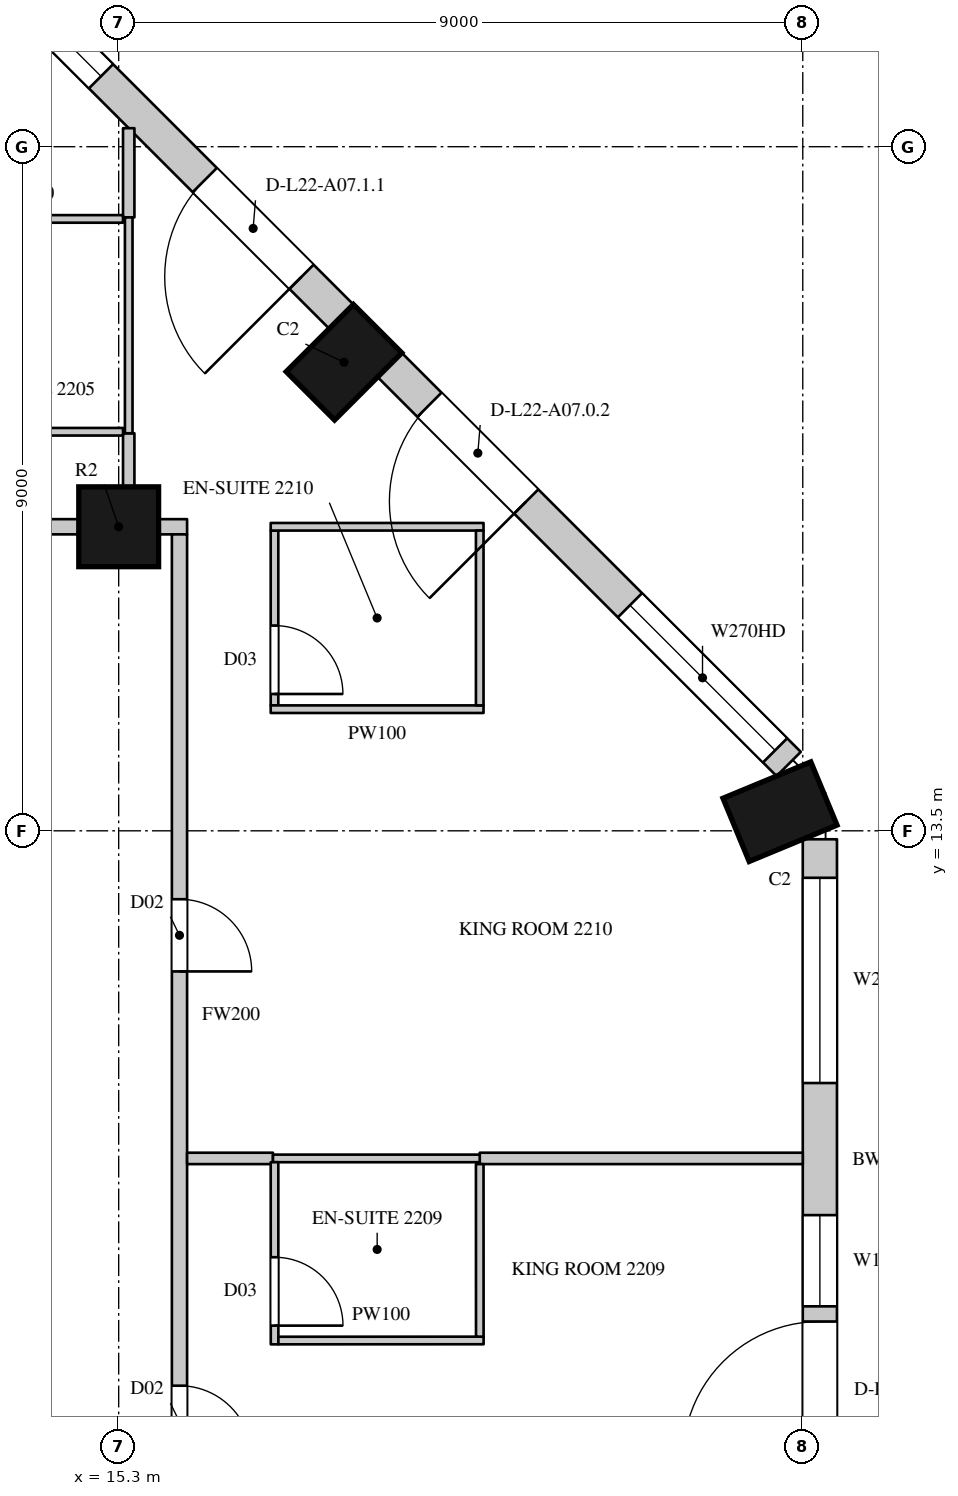
"""IFC4 building model, lengths in metres.
Left out: names, types, materials, properties, quantities, classifications, styles, units other than length and angle.
Written with IfcOpenShell. Run it as: python <this file> out.ifc"""

import sys

from ifc_helpers import new_model, si_unit, direction, frame, frame_2d, origin, origin_2d, place, context, subcontext, project, spatial, rectangle, circle, extrude, element, fill, save


model = new_model("IFC4")
c1 = context("Model", 3, precision=1e-05, world=origin(), true_north=direction((0.0, 1.0)))
c2 = subcontext(c1, "Body", "Model", "MODEL_VIEW")
j1 = project(units=[si_unit("LENGTHUNIT", "METRE"), si_unit("PLANEANGLEUNIT", "RADIAN")], contexts=[c1])
p1 = place(None, origin())
s1 = spatial("IfcSite", under=j1, at=p1, CompositionType="ELEMENT")
p2 = place(p1, origin())
s2 = spatial("IfcBuilding", under=s1, at=p2, CompositionType="ELEMENT")
p3 = place(p2, frame((0.0, 0.0, 109.5)))
s3 = spatial("IfcBuildingStorey", under=s2, at=p3, CompositionType="ELEMENT", Elevation=109.5)
for number, where, z_axis, x_axis in (
    (1, (24.0, 13.752, 0.0), (0.0, 0.0, 1.0), (-0.383, 0.924, 0.0)),
    (2, (18.264, 19.664, 0.0), (0.0, 0.0, 1.0), (-0.707, 0.707, 0.0)),
):
    element("IfcColumn", number, at=place(p3, frame(where, z_axis=z_axis, x_axis=x_axis)), inside=s3, PredefinedType="COLUMN", context=c2, shape_type="SweptSolid", body=[
        extrude(rectangle(XDim=0.9, YDim=1.25, at=origin_2d()), origin(), (0.0, 0.0, 1.0), 3.6),
    ])
p4 = place(p3, frame((15.3, 17.5, 0.0), z_axis=(0.0, 0.0, 1.0), x_axis=(1.0, 0.0, 0.0)))
e3 = element("IfcColumn", 3, at=p4, inside=s3, PredefinedType="COLUMN", context=c2, shape_type="SweptSolid", body=[
    extrude(circle(Radius=0.525, at=origin_2d()), origin(), (0.0, 0.0, 1.0), 3.6),
])
p5 = place(p3, frame((24.525, 4.95, 0.0), z_axis=(0.0, 0.0, 1.0), x_axis=(0.0, 1.0, 0.0)))
e4 = element("IfcWall", 4, at=p5, inside=s3, PredefinedType="SOLIDWALL", context=c2, shape_type="SweptSolid", body=[
    extrude(rectangle(XDim=8.439, YDim=0.45, at=frame_2d((4.219, 0.0))), origin(), (0.0, 0.0, 1.0), 3.3),
])
p6 = place(p5, frame((0.294, 0.0, 0.0)))
e5 = element("IfcOpeningElement", 5, at=p6, cuts=e4, PredefinedType="OPENING", context=c2, shape_type="SweptSolid", body=[
    extrude(rectangle(XDim=1.8, YDim=2.4, at=frame_2d((0.9, 1.2))), frame((0.0, 0.235, 0.0), z_axis=(0.0, -1.0, 0.0), x_axis=(1.0, 0.0, 0.0)), (0.0, 0.0, 1.0), 0.47),
])
p7 = place(p5, frame((2.294, 0.0, 1.05)))
e6 = element("IfcOpeningElement", 6, at=p7, cuts=e4, PredefinedType="OPENING", context=c2, shape_type="SweptSolid", body=[
    extrude(rectangle(XDim=1.2, YDim=2.0, at=frame_2d((0.6, 1.0))), frame((0.0, 0.235, 0.0), z_axis=(0.0, -1.0, 0.0), x_axis=(1.0, 0.0, 0.0)), (0.0, 0.0, 1.0), 0.47),
])
p8 = place(p5, frame((5.232, 0.0, 1.05)))
e7 = element("IfcOpeningElement", 7, at=p8, cuts=e4, PredefinedType="OPENING", context=c2, shape_type="SweptSolid", body=[
    extrude(rectangle(XDim=2.7, YDim=2.0, at=frame_2d((1.35, 1.0))), frame((0.0, 0.235, 0.0), z_axis=(0.0, -1.0, 0.0), x_axis=(1.0, 0.0, 0.0)), (0.0, 0.0, 1.0), 0.47),
])
p9 = place(p3, frame((24.115, 14.379, 0.0), z_axis=(0.0, 0.0, 1.0), x_axis=(-0.707106781187, 0.707106781187, 0.0)))
e8 = element("IfcWall", 8, at=p9, inside=s3, PredefinedType="SOLIDWALL", context=c2, shape_type="SweptSolid", body=[
    extrude(rectangle(XDim=7.424, YDim=0.45, at=frame_2d((3.712, 0.0))), origin(), (0.0, 0.0, 1.0), 3.3),
])
p10 = place(p9, frame((0.253, 0.0, 1.05)))
e9 = element("IfcOpeningElement", 9, at=p10, cuts=e8, PredefinedType="OPENING", context=c2, shape_type="SweptSolid", body=[
    extrude(rectangle(XDim=2.7, YDim=2.0, at=frame_2d((1.35, 1.0))), frame((0.0, 0.235, 0.0), z_axis=(0.0, -1.0, 0.0), x_axis=(1.0, 0.0, 0.0)), (0.0, 0.0, 1.0), 0.47),
])
p11 = place(p9, frame((4.884, 0.0, 0.0)))
e10 = element("IfcOpeningElement", 10, at=p11, cuts=e8, PredefinedType="OPENING", context=c2, shape_type="SweptSolid", body=[
    extrude(rectangle(XDim=1.8, YDim=2.4, at=frame_2d((0.9, 1.2))), frame((0.0, 0.235, 0.0), z_axis=(0.0, -1.0, 0.0), x_axis=(1.0, 0.0, 0.0)), (0.0, 0.0, 1.0), 0.47),
])
p12 = place(p3, frame((18.229, 20.265, 0.0), z_axis=(0.0, 0.0, 1.0), x_axis=(-0.707106781187, 0.707106781187, 0.0)))
e11 = element("IfcWall", 11, at=p12, inside=s3, PredefinedType="SOLIDWALL", context=c2, shape_type="SweptSolid", body=[
    extrude(rectangle(XDim=7.424, YDim=0.45, at=frame_2d((3.712, 0.0))), origin(), (0.0, 0.0, 1.0), 3.3),
])
p13 = place(p12, frame((0.74, 0.0, 0.0)))
e12 = element("IfcOpeningElement", 12, at=p13, cuts=e11, PredefinedType="OPENING", context=c2, shape_type="SweptSolid", body=[
    extrude(rectangle(XDim=1.8, YDim=2.4, at=frame_2d((0.9, 1.2))), frame((0.0, 0.235, 0.0), z_axis=(0.0, -1.0, 0.0), x_axis=(1.0, 0.0, 0.0)), (0.0, 0.0, 1.0), 0.47),
])
p14 = place(p12, frame((4.471, 0.0, 1.05)))
e13 = element("IfcOpeningElement", 13, at=p14, cuts=e11, PredefinedType="OPENING", context=c2, shape_type="SweptSolid", body=[
    extrude(rectangle(XDim=2.7, YDim=2.0, at=frame_2d((1.35, 1.0))), frame((0.0, 0.235, 0.0), z_axis=(0.0, -1.0, 0.0), x_axis=(1.0, 0.0, 0.0)), (0.0, 0.0, 1.0), 0.47),
])
p15 = place(p3, frame((23.15, 16.864, 0.0), z_axis=(0.0, 0.0, 1.0), x_axis=(-0.707106781187, 0.707106781187, 0.0)))
e14 = element("IfcWall", 14, at=p15, inside=s3, PredefinedType="SOLIDWALL", context=c2, shape_type="SweptSolid", body=[
    extrude(rectangle(XDim=1.445, YDim=0.45, at=frame_2d((0.722, 0.0))), origin(), (0.0, 0.0, 1.0), 0.6),
])
p16 = place(p3, frame((19.937, 20.078, 0.0), z_axis=(0.0, 0.0, 1.0), x_axis=(-0.707106781187, 0.707106781187, 0.0)))
e15 = element("IfcWall", 15, at=p16, inside=s3, PredefinedType="SOLIDWALL", context=c2, shape_type="SweptSolid", body=[
    extrude(rectangle(XDim=1.781, YDim=0.45, at=frame_2d((0.89, 0.0))), origin(), (0.0, 0.0, 1.0), 0.6),
])
p17 = place(p3, frame((16.486, 23.529, 0.0), z_axis=(0.0, 0.0, 1.0), x_axis=(-0.707022305137, 0.707191247145, 0.0)))
e16 = element("IfcWall", 16, at=p17, inside=s3, PredefinedType="SOLIDWALL", context=c2, shape_type="SweptSolid", body=[
    extrude(rectangle(XDim=1.445, YDim=0.45, at=frame_2d((0.723, 0.0))), origin(), (0.0, 0.0, 1.0), 0.6),
])
p18 = place(p3, frame((6.825, 17.5, 0.0), z_axis=(0.0, 0.0, 1.0), x_axis=(1.0, 0.0, 0.0)))
e17 = element("IfcWall", 17, at=p18, inside=s3, PredefinedType="PARTITIONING", context=c2, shape_type="SweptSolid", body=[
    extrude(rectangle(XDim=7.95, YDim=0.2, at=frame_2d((3.975, 0.0))), origin(), (0.0, 0.0, 1.0), 2.75),
])
p19 = place(p18, frame((1.55, 0.0, 0.0)))
e18 = element("IfcOpeningElement", 18, at=p19, cuts=e17, PredefinedType="OPENING", context=c2, shape_type="SweptSolid", body=[
    extrude(rectangle(XDim=1.1, YDim=2.4, at=frame_2d((0.55, 1.2))), frame((0.0, 0.11, 0.0), z_axis=(0.0, -1.0, 0.0), x_axis=(1.0, 0.0, 0.0)), (0.0, 0.0, 1.0), 0.22),
])
p20 = place(p3, frame((15.825, 17.5, 0.0), z_axis=(0.0, 0.0, 1.0), x_axis=(1.0, 0.0, 0.0)))
e19 = element("IfcWall", 19, at=p20, inside=s3, PredefinedType="PARTITIONING", context=c2, shape_type="SweptSolid", body=[
    extrude(rectangle(XDim=0.375, YDim=0.2, at=frame_2d((0.188, 0.0))), origin(), (0.0, 0.0, 1.0), 3.3),
])
p21 = place(p3, frame((16.1, 4.75, 0.0), z_axis=(0.0, 0.0, 1.0), x_axis=(0.0, 1.0, 0.0)))
e20 = element("IfcWall", 20, at=p21, inside=s3, PredefinedType="PARTITIONING", context=c2, shape_type="SweptSolid", body=[
    extrude(rectangle(XDim=12.65, YDim=0.2, at=frame_2d((6.325, 0.0))), origin(), (0.0, 0.0, 1.0), 3.3),
])
p22 = place(p21, frame((0.5, 0.0, 0.0)))
e21 = element("IfcOpeningElement", 21, at=p22, cuts=e20, PredefinedType="OPENING", context=c2, shape_type="SweptSolid", body=[
    extrude(rectangle(XDim=0.95, YDim=2.2, at=frame_2d((0.475, 1.1))), frame((0.0, 0.11, 0.0), z_axis=(0.0, -1.0, 0.0), x_axis=(1.0, 0.0, 0.0)), (0.0, 0.0, 1.0), 0.22),
])
p23 = place(p21, frame((6.9, 0.0, 0.0)))
e22 = element("IfcOpeningElement", 22, at=p23, cuts=e20, PredefinedType="OPENING", context=c2, shape_type="SweptSolid", body=[
    extrude(rectangle(XDim=0.95, YDim=2.2, at=frame_2d((0.475, 1.1))), frame((0.0, 0.11, 0.0), z_axis=(0.0, -1.0, 0.0), x_axis=(1.0, 0.0, 0.0)), (0.0, 0.0, 1.0), 0.22),
])
p24 = place(p3, frame((15.432, 18.016, 0.0), z_axis=(0.0, 0.0, 1.0), x_axis=(0.0, 1.0, 0.0)))
e23 = element("IfcWall", 23, at=p24, inside=s3, PredefinedType="PARTITIONING", context=c2, shape_type="SweptSolid", body=[
    extrude(rectangle(XDim=0.714, YDim=0.15, at=frame_2d((0.357, 0.0))), origin(), (0.0, 0.0, 1.0), 3.3),
])
p25 = place(p3, frame((15.432, 21.57, 0.0), z_axis=(0.0, 0.0, 1.0), x_axis=(0.0, 1.0, 0.0)))
e24 = element("IfcWall", 24, at=p25, inside=s3, PredefinedType="PARTITIONING", context=c2, shape_type="SweptSolid", body=[
    extrude(rectangle(XDim=1.174, YDim=0.15, at=frame_2d((0.587, 0.0))), origin(), (0.0, 0.0, 1.0), 3.3),
])
p26 = place(p3, frame((16.2, 9.19, 0.0), z_axis=(0.0, 0.0, 1.0), x_axis=(1.0, 0.0, 0.0)))
e25 = element("IfcWall", 25, at=p26, inside=s3, PredefinedType="PARTITIONING", context=c2, shape_type="SweptSolid", body=[
    extrude(rectangle(XDim=1.13, YDim=0.15, at=frame_2d((0.565, 0.0))), origin(), (0.0, 0.0, 1.0), 2.65),
])
p27 = place(p3, frame((20.05, 9.19, 0.0), z_axis=(0.0, 0.0, 1.0), x_axis=(1.0, 0.0, 0.0)))
e26 = element("IfcWall", 26, at=p27, inside=s3, PredefinedType="PARTITIONING", context=c2, shape_type="SweptSolid", body=[
    extrude(rectangle(XDim=4.25, YDim=0.15, at=frame_2d((2.125, 0.0))), origin(), (0.0, 0.0, 1.0), 2.65),
])
for number, where, z_axis, x_axis in (
    (27, (12.786, 18.75, 0.0), (0.0, 0.0, 1.0), (1.0, 0.0, 0.0)),
    (28, (12.786, 21.55, 0.0), (0.0, 0.0, 1.0), (1.0, 0.0, 0.0)),
):
    element("IfcWall", number, at=place(p3, frame(where, z_axis=z_axis, x_axis=x_axis)), inside=s3, PredefinedType="PARTITIONING", context=c2, shape_type="SweptSolid", body=[
        extrude(rectangle(XDim=2.571, YDim=0.1, at=frame_2d((1.286, 0.0))), origin(), (0.0, 0.0, 1.0), 3.3),
    ])
p28 = place(p3, frame((15.432, 18.73, 0.0), z_axis=(0.0, 0.0, 1.0), x_axis=(0.0, 1.0, 0.0)))
e29 = element("IfcWall", 29, at=p28, inside=s3, PredefinedType="PARTITIONING", context=c2, shape_type="SweptSolid", body=[
    extrude(rectangle(XDim=2.84, YDim=0.1, at=frame_2d((1.42, 0.0))), origin(), (0.0, 0.0, 1.0), 3.3),
])
p29 = place(p3, frame((17.33, 9.19, 0.0), z_axis=(0.0, 0.0, 1.0), x_axis=(1.0, 0.0, 0.0)))
e30 = element("IfcWall", 30, at=p29, inside=s3, PredefinedType="PARTITIONING", context=c2, shape_type="SweptSolid", body=[
    extrude(rectangle(XDim=2.72, YDim=0.1, at=frame_2d((1.36, 0.0))), origin(), (0.0, 0.0, 1.0), 2.65),
])
p30 = place(p3, frame((17.35, 9.14, 0.0), z_axis=(0.0, 0.0, 1.0), x_axis=(0.000407580973, -0.999999916939, 0.0)))
e31 = element("IfcWall", 31, at=p30, inside=s3, PredefinedType="PARTITIONING", context=c2, shape_type="SweptSolid", body=[
    extrude(rectangle(XDim=2.396, YDim=0.1, at=frame_2d((1.198, 0.0))), origin(), (0.0, 0.0, 1.0), 3.3),
])
p31 = place(p30, frame((1.25, 0.0, 0.0)))
e32 = element("IfcOpeningElement", 32, at=p31, cuts=e31, PredefinedType="OPENING", context=c2, shape_type="SweptSolid", body=[
    extrude(rectangle(XDim=0.9, YDim=2.2, at=frame_2d((0.45, 1.1))), frame((0.0, 0.06, 0.0), z_axis=(0.0, -1.0, 0.0), x_axis=(1.0, 0.0, 0.0)), (0.0, 0.0, 1.0), 0.12),
])
p32 = place(p3, frame((17.35, 15.15, 0.0), z_axis=(0.0, 0.0, 1.0), x_axis=(0.0, 1.0, 0.0)))
e33 = element("IfcWall", 33, at=p32, inside=s3, PredefinedType="PARTITIONING", context=c2, shape_type="SweptSolid", body=[
    extrude(rectangle(XDim=2.3, YDim=0.1, at=frame_2d((1.15, 0.0))), origin(), (0.0, 0.0, 1.0), 3.3),
])
p33 = place(p32, frame((0.15, 0.0, 0.0)))
e34 = element("IfcOpeningElement", 34, at=p33, cuts=e33, PredefinedType="OPENING", context=c2, shape_type="SweptSolid", body=[
    extrude(rectangle(XDim=0.9, YDim=2.2, at=frame_2d((0.45, 1.1))), frame((0.0, 0.06, 0.0), z_axis=(0.0, -1.0, 0.0), x_axis=(1.0, 0.0, 0.0)), (0.0, 0.0, 1.0), 0.12),
])
for number, where, z_axis, x_axis in (
    (35, (17.3, 15.1, 0.0), (0.0, 0.0, 1.0), (1.0, 0.0, 0.0)),
    (36, (17.3, 17.5, 0.0), (0.0, 0.0, 1.0), (1.0, 0.0, 0.0)),
):
    element("IfcWall", number, at=place(p3, frame(where, z_axis=z_axis, x_axis=x_axis)), inside=s3, PredefinedType="PARTITIONING", context=c2, shape_type="SweptSolid", body=[
        extrude(rectangle(XDim=2.8, YDim=0.1, at=frame_2d((1.4, 0.0))), origin(), (0.0, 0.0, 1.0), 3.3),
    ])
p34 = place(p3, frame((17.401, 6.794, 0.0), z_axis=(0.0, 0.0, 1.0), x_axis=(0.9999999346, 0.000361663629, 0.0)))
e37 = element("IfcWall", 37, at=p34, inside=s3, PredefinedType="PARTITIONING", context=c2, shape_type="SweptSolid", body=[
    extrude(rectangle(XDim=2.7, YDim=0.1, at=frame_2d((1.35, 0.0))), origin(), (0.0, 0.0, 1.0), 3.3),
])
p35 = place(p3, frame((20.05, 9.115, 0.0), z_axis=(0.0, 0.0, 1.0), x_axis=(0.000430200003, -0.999999907464, 0.0)))
e38 = element("IfcWall", 38, at=p35, inside=s3, PredefinedType="PARTITIONING", context=c2, shape_type="SweptSolid", body=[
    extrude(rectangle(XDim=2.27, YDim=0.1, at=frame_2d((1.135, 0.0))), origin(), (0.0, 0.0, 1.0), 3.3),
])
p36 = place(p3, frame((20.05, 15.15, 0.0), z_axis=(0.0, 0.0, 1.0), x_axis=(0.0, 1.0, 0.0)))
e39 = element("IfcWall", 39, at=p36, inside=s3, PredefinedType="PARTITIONING", context=c2, shape_type="SweptSolid", body=[
    extrude(rectangle(XDim=2.3, YDim=0.1, at=frame_2d((1.15, 0.0))), origin(), (0.0, 0.0, 1.0), 3.3),
])
p37 = place(p6, origin())
e40 = element("IfcDoor", 40, at=p37, inside=s3, OperationType="SLIDING_TO_LEFT", PredefinedType="DOOR", context=c2, shape_type="SweptSolid", body=[
    extrude(rectangle(XDim=1.8, YDim=2.4, at=frame_2d((0.9, 1.2))), frame((0.0, 0.13, 0.0), z_axis=(0.0, -1.0, 0.0), x_axis=(1.0, 0.0, 0.0)), (0.0, 0.0, 1.0), 0.05),
])
fill(e5, e40)
p38 = place(p7, origin())
e41 = element("IfcWindow", 41, at=p38, inside=s3, PartitioningType="SINGLE_PANEL", PredefinedType="WINDOW", context=c2, shape_type="SweptSolid", body=[
    extrude(rectangle(XDim=1.2, YDim=2.0, at=frame_2d((0.6, 1.0))), frame((0.0, 0.135, 0.0), z_axis=(0.0, -1.0, 0.0), x_axis=(1.0, 0.0, 0.0)), (0.0, 0.0, 1.0), 0.06),
])
fill(e6, e41)
p39 = place(p8, origin())
e42 = element("IfcWindow", 42, at=p39, inside=s3, PartitioningType="SINGLE_PANEL", PredefinedType="WINDOW", context=c2, shape_type="SweptSolid", body=[
    extrude(rectangle(XDim=2.7, YDim=2.0, at=frame_2d((1.35, 1.0))), frame((0.0, 0.135, 0.0), z_axis=(0.0, -1.0, 0.0), x_axis=(1.0, 0.0, 0.0)), (0.0, 0.0, 1.0), 0.06),
])
fill(e7, e42)
p40 = place(p10, origin())
e43 = element("IfcWindow", 43, at=p40, inside=s3, PartitioningType="SINGLE_PANEL", PredefinedType="WINDOW", context=c2, shape_type="SweptSolid", body=[
    extrude(rectangle(XDim=2.7, YDim=2.0, at=frame_2d((1.35, 1.0))), frame((0.0, 0.135, 0.0), z_axis=(0.0, -1.0, 0.0), x_axis=(1.0, 0.0, 0.0)), (0.0, 0.0, 1.0), 0.06),
])
fill(e9, e43)
p41 = place(p11, origin())
e44 = element("IfcDoor", 44, at=p41, inside=s3, OperationType="SLIDING_TO_LEFT", PredefinedType="DOOR", context=c2, shape_type="SweptSolid", body=[
    extrude(rectangle(XDim=1.8, YDim=2.4, at=frame_2d((0.9, 1.2))), frame((0.0, 0.13, 0.0), z_axis=(0.0, -1.0, 0.0), x_axis=(1.0, 0.0, 0.0)), (0.0, 0.0, 1.0), 0.05),
])
fill(e10, e44)
p42 = place(p13, origin())
e45 = element("IfcDoor", 45, at=p42, inside=s3, OperationType="SLIDING_TO_LEFT", PredefinedType="DOOR", context=c2, shape_type="SweptSolid", body=[
    extrude(rectangle(XDim=1.8, YDim=2.4, at=frame_2d((0.9, 1.2))), frame((0.0, 0.13, 0.0), z_axis=(0.0, -1.0, 0.0), x_axis=(1.0, 0.0, 0.0)), (0.0, 0.0, 1.0), 0.05),
])
fill(e12, e45)
p43 = place(p14, origin())
e46 = element("IfcWindow", 46, at=p43, inside=s3, PartitioningType="SINGLE_PANEL", PredefinedType="WINDOW", context=c2, shape_type="SweptSolid", body=[
    extrude(rectangle(XDim=2.7, YDim=2.0, at=frame_2d((1.35, 1.0))), frame((0.0, 0.135, 0.0), z_axis=(0.0, -1.0, 0.0), x_axis=(1.0, 0.0, 0.0)), (0.0, 0.0, 1.0), 0.06),
])
fill(e13, e46)
p44 = place(p22, origin())
e47 = element("IfcDoor", 47, at=p44, inside=s3, OperationType="SINGLE_SWING_RIGHT", PredefinedType="DOOR", context=c2, shape_type="SweptSolid", body=[
    extrude(rectangle(XDim=0.95, YDim=2.2, at=frame_2d((0.475, 1.1))), frame((0.0, 0.025, 0.0), z_axis=(0.0, -1.0, 0.0), x_axis=(1.0, 0.0, 0.0)), (0.0, 0.0, 1.0), 0.05),
])
fill(e21, e47)
p45 = place(p31, origin())
e48 = element("IfcDoor", 48, at=p45, inside=s3, OperationType="SINGLE_SWING_RIGHT", PredefinedType="DOOR", context=c2, shape_type="SweptSolid", body=[
    extrude(rectangle(XDim=0.9, YDim=2.2, at=frame_2d((0.45, 1.1))), frame((0.0, 0.025, 0.0), z_axis=(0.0, -1.0, 0.0), x_axis=(1.0, 0.0, 0.0)), (0.0, 0.0, 1.0), 0.05),
])
fill(e32, e48)
p46 = place(p23, origin())
e49 = element("IfcDoor", 49, at=p46, inside=s3, OperationType="SINGLE_SWING_RIGHT", PredefinedType="DOOR", context=c2, shape_type="SweptSolid", body=[
    extrude(rectangle(XDim=0.95, YDim=2.2, at=frame_2d((0.475, 1.1))), frame((0.0, 0.025, 0.0), z_axis=(0.0, -1.0, 0.0), x_axis=(1.0, 0.0, 0.0)), (0.0, 0.0, 1.0), 0.05),
])
fill(e22, e49)
p47 = place(p33, origin())
e50 = element("IfcDoor", 50, at=p47, inside=s3, OperationType="SINGLE_SWING_RIGHT", PredefinedType="DOOR", context=c2, shape_type="SweptSolid", body=[
    extrude(rectangle(XDim=0.9, YDim=2.2, at=frame_2d((0.45, 1.1))), frame((0.0, 0.025, 0.0), z_axis=(0.0, -1.0, 0.0), x_axis=(1.0, 0.0, 0.0)), (0.0, 0.0, 1.0), 0.05),
])
fill(e34, e50)
save(model, sys.argv[1])
